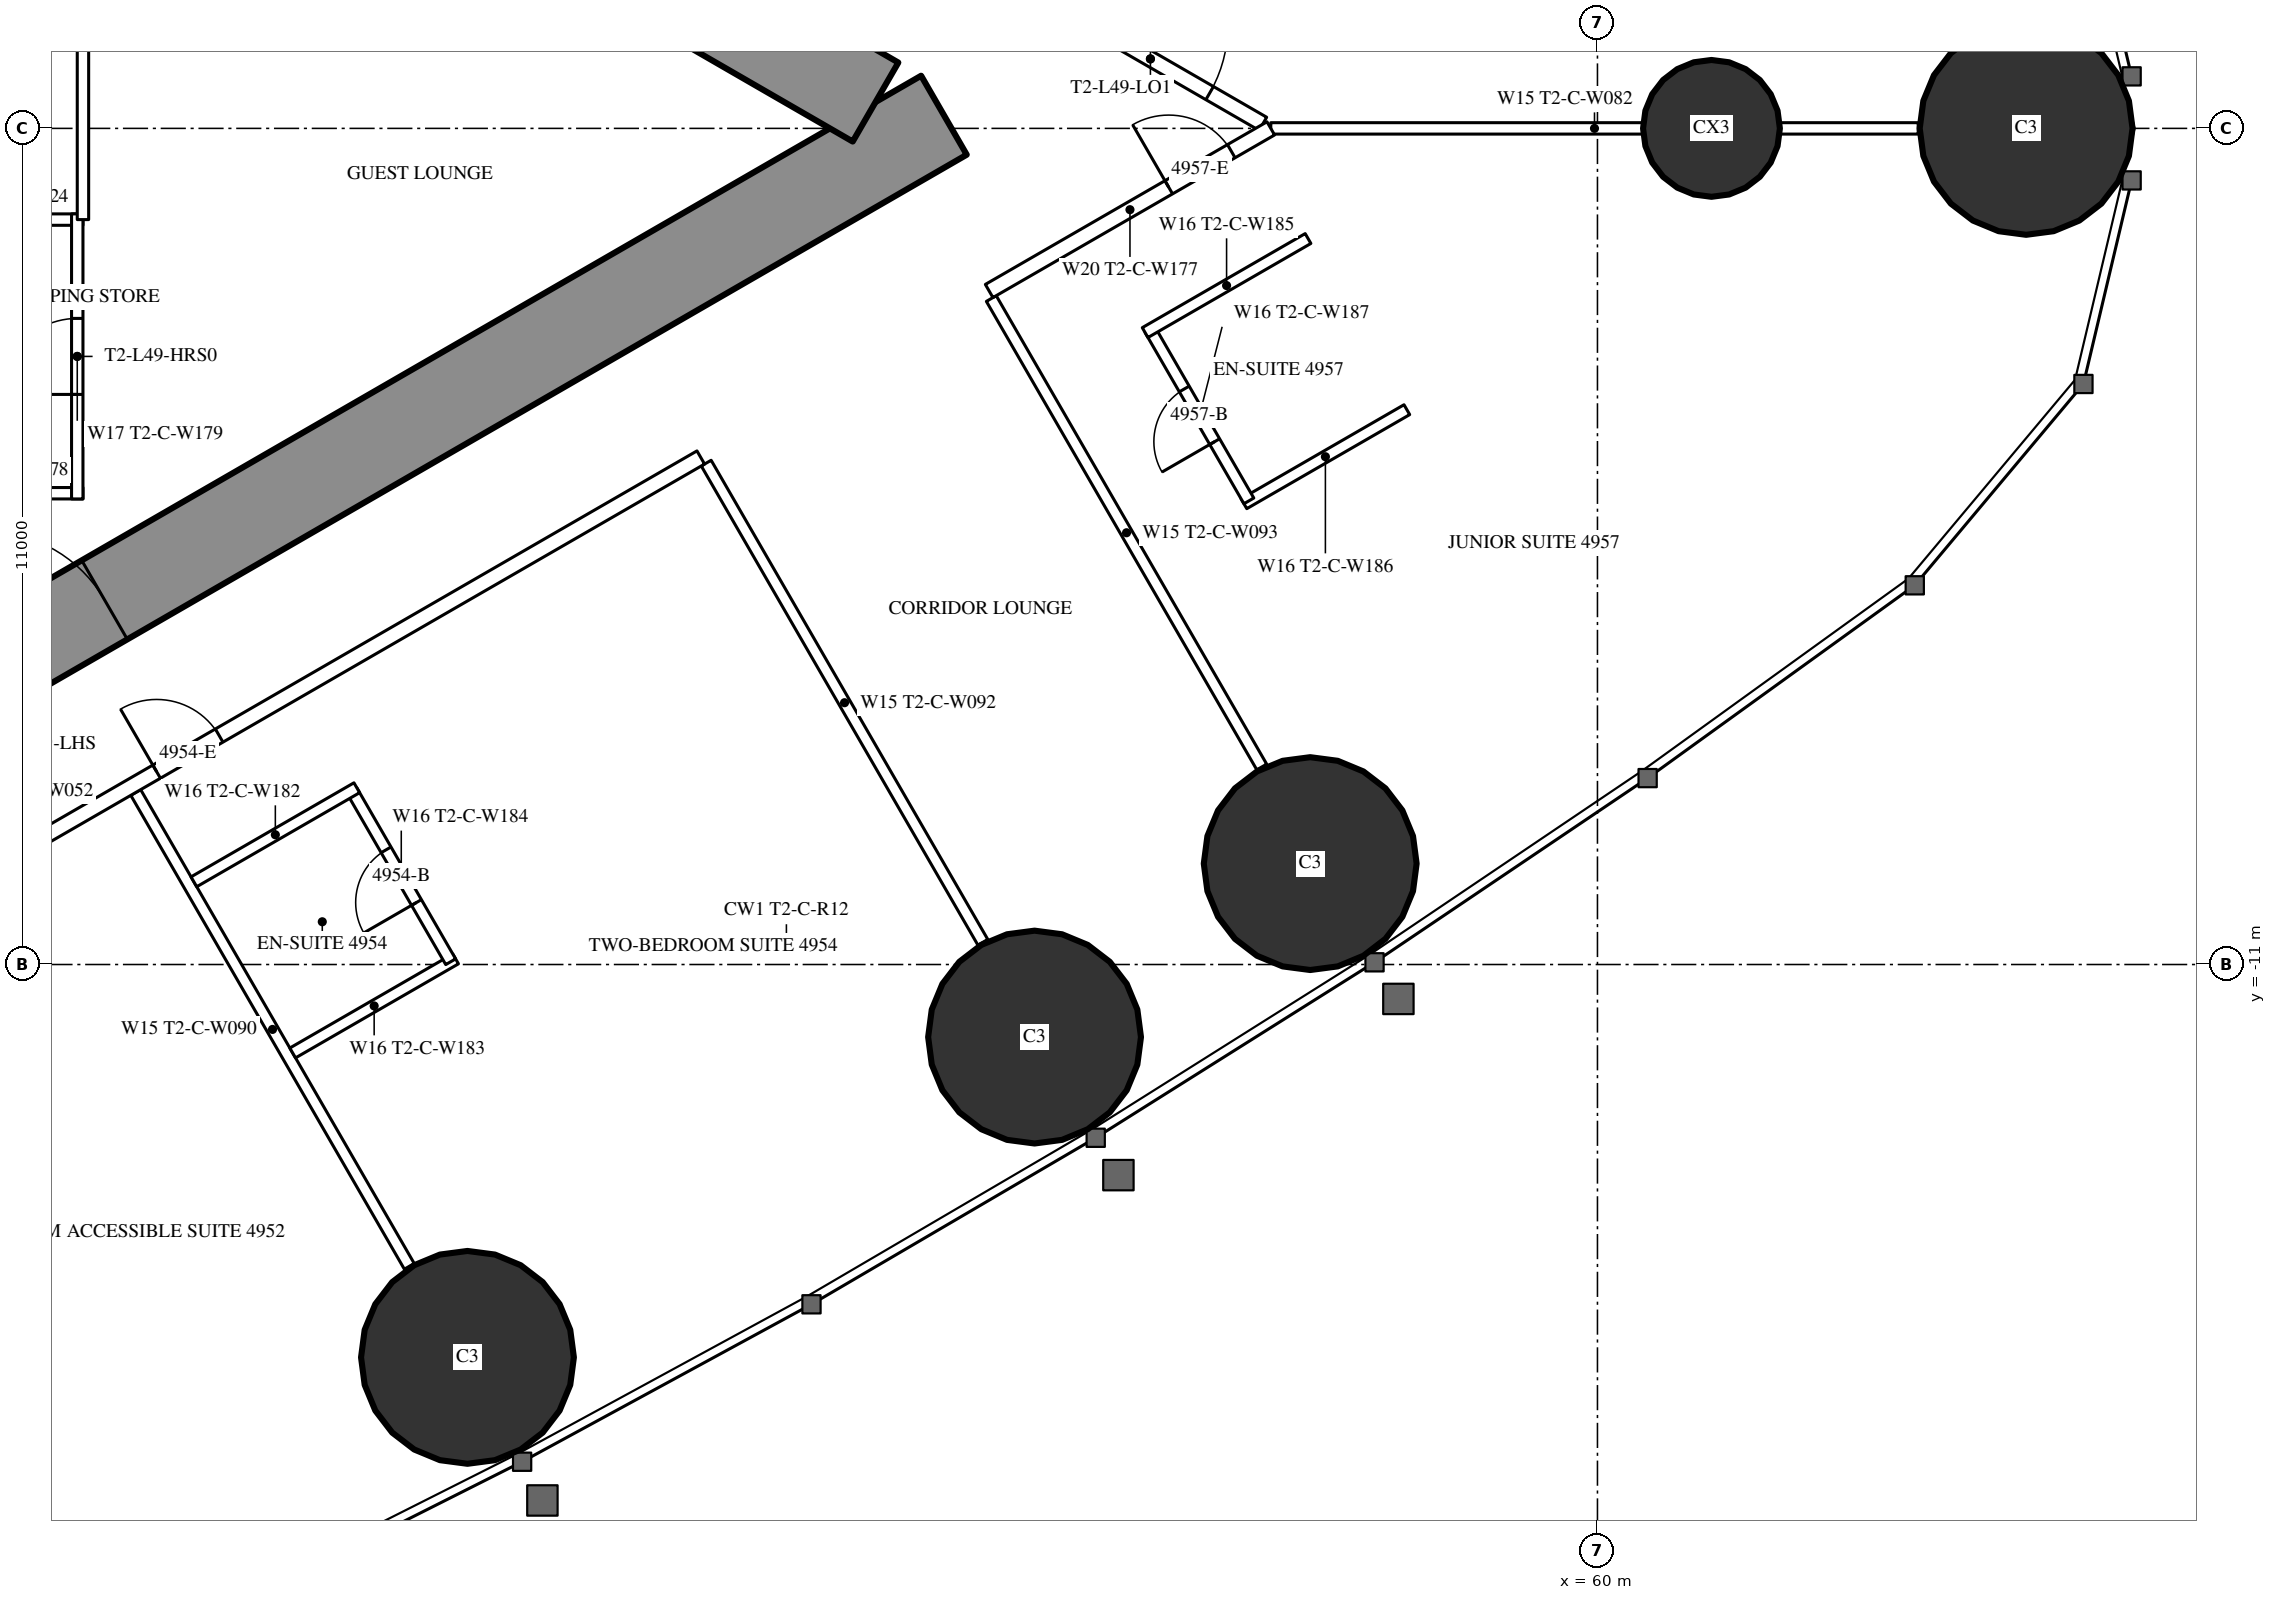
"""IFC4 building model, lengths in metres.
Left out: names, types, materials, properties, quantities, classifications, styles, units other than length and angle.
Written with IfcOpenShell. Run it as: python <this file> out.ifc"""

import sys

from ifc_helpers import new_model, si_unit, direction, frame, frame_2d, origin, origin_2d, place, context, subcontext, project, spatial, rectangle, circle, extrude, element, fill, save


model = new_model("IFC4")
c1 = context("Model", 3, precision=1e-05, world=origin(), true_north=direction((0.0, 1.0)))
c2 = subcontext(c1, "Body", "Model", "MODEL_VIEW")
j1 = project(units=[si_unit("LENGTHUNIT", "METRE"), si_unit("PLANEANGLEUNIT", "RADIAN")], contexts=[c1])
p1 = place(None, origin())
s1 = spatial("IfcSite", under=j1, at=p1, CompositionType="ELEMENT")
p2 = place(p1, origin())
s2 = spatial("IfcBuilding", under=s1, at=p2, CompositionType="ELEMENT")
p3 = place(p2, frame((0.0, 0.0, 184.3)))
s3 = spatial("IfcBuildingStorey", under=s2, at=p3, CompositionType="ELEMENT", Elevation=184.3)
for number, where, z_axis, x_axis in (
    (1, (65.64, 0.0, 0.0), (0.0, 0.0, 1.0), (1.0, 0.0, 0.0)),
    (2, (45.134, -16.168, 0.0), (0.0, 0.0, 1.0), (1.0, 0.0, 0.0)),
    (3, (52.594, -11.955, 0.0), (0.0, 0.0, 1.0), (1.0, 0.0, 0.0)),
    (4, (56.221, -9.672, 0.0), (0.0, 0.0, 1.0), (1.0, 0.0, 0.0)),
):
    element("IfcColumn", number, at=place(p3, frame(where, z_axis=z_axis, x_axis=x_axis)), inside=s3, PredefinedType="COLUMN", context=c2, shape_type="SweptSolid", body=[
        extrude(circle(Radius=1.4, at=origin_2d()), origin(), (0.0, 0.0, 1.0), 3.5),
    ])
p4 = place(p3, frame((61.5, 0.0, 0.0), z_axis=(0.0, 0.0, 1.0), x_axis=(1.0, 0.0, 0.0)))
e5 = element("IfcColumn", 5, at=p4, inside=s3, PredefinedType="COLUMN", context=c2, shape_type="SweptSolid", body=[
    extrude(circle(Radius=0.9, at=origin_2d()), origin(), (0.0, 0.0, 1.0), 3.5),
])
p5 = place(p3, frame((27.2, -13.8, 0.0), z_axis=(0.0, 0.0, 1.0), x_axis=(0.866027159892, 0.499996958321, 0.0)))
e6 = element("IfcWall", 6, at=p5, inside=s3, PredefinedType="SHEAR", context=c2, shape_type="SweptSolid", body=[
    extrude(rectangle(XDim=27.947, YDim=1.2, at=frame_2d((13.973, 0.0))), origin(), (0.0, 0.0, 1.0), 3.5),
])
p6 = place(p5, frame((4.6, 0.0, 0.0)))
e7 = element("IfcOpeningElement", 7, at=p6, cuts=e6, PredefinedType="OPENING", context=c2, shape_type="SweptSolid", body=[
    extrude(rectangle(XDim=1.0, YDim=2.2, at=frame_2d((0.5, 1.1))), frame((0.0, 0.61, 0.0), z_axis=(0.0, -1.0, 0.0), x_axis=(1.0, 0.0, 0.0)), (0.0, 0.0, 1.0), 1.22),
])
p7 = place(p5, frame((13.395, 0.0, 0.0)))
e8 = element("IfcOpeningElement", 8, at=p7, cuts=e6, PredefinedType="OPENING", context=c2, shape_type="SweptSolid", body=[
    extrude(rectangle(XDim=1.8, YDim=2.2, at=frame_2d((0.9, 1.1))), frame((0.0, 0.61, 0.0), z_axis=(0.0, -1.0, 0.0), x_axis=(1.0, 0.0, 0.0)), (0.0, 0.0, 1.0), 1.22),
])
p8 = place(p3, frame((27.2, 13.8, 0.0), z_axis=(0.0, 0.0, 1.0), x_axis=(0.866024515034, -0.500001539357, 0.0)))
e9 = element("IfcWall", 9, at=p8, inside=s3, PredefinedType="SHEAR", context=c2, shape_type="SweptSolid", body=[
    extrude(rectangle(XDim=26.907, YDim=1.2, at=frame_2d((13.454, 0.0))), origin(), (0.0, 0.0, 1.0), 3.5),
])
p9 = place(p8, frame((4.6, 0.0, 0.0)))
e10 = element("IfcOpeningElement", 10, at=p9, cuts=e9, PredefinedType="OPENING", context=c2, shape_type="SweptSolid", body=[
    extrude(rectangle(XDim=1.0, YDim=2.2, at=frame_2d((0.5, 1.1))), frame((0.0, 0.61, 0.0), z_axis=(0.0, -1.0, 0.0), x_axis=(1.0, 0.0, 0.0)), (0.0, 0.0, 1.0), 1.22),
])
p10 = place(p8, frame((13.395, 0.0, 0.0)))
e11 = element("IfcOpeningElement", 11, at=p10, cuts=e9, PredefinedType="OPENING", context=c2, shape_type="SweptSolid", body=[
    extrude(rectangle(XDim=1.8, YDim=2.2, at=frame_2d((0.9, 1.1))), frame((0.0, 0.61, 0.0), z_axis=(0.0, -1.0, 0.0), x_axis=(1.0, 0.0, 0.0)), (0.0, 0.0, 1.0), 1.22),
])
p11 = place(p3, frame((40.769, -8.737, 0.0), z_axis=(0.0, 0.0, 1.0), x_axis=(0.500013115284, -0.866017831539, 0.0)))
e12 = element("IfcWall", 12, at=p11, inside=s3, PredefinedType="PARTITIONING", context=c2, shape_type="SweptSolid", body=[
    extrude(rectangle(XDim=7.198, YDim=0.15, at=frame_2d((3.599, 0.0))), origin(), (0.0, 0.0, 1.0), 2.3),
])
p12 = place(p3, frame((48.275, -4.404, 0.0), z_axis=(0.0, 0.0, 1.0), x_axis=(0.500006004368, -0.866021937133, 0.0)))
e13 = element("IfcWall", 13, at=p12, inside=s3, PredefinedType="PARTITIONING", context=c2, shape_type="SweptSolid", body=[
    extrude(rectangle(XDim=7.279, YDim=0.15, at=frame_2d((3.64, 0.0))), origin(), (0.0, 0.0, 1.0), 2.3),
])
p13 = place(p3, frame((52.025, -2.238, 0.0), z_axis=(0.0, 0.0, 1.0), x_axis=(0.499983785035, -0.866034765296, 0.0)))
e14 = element("IfcWall", 14, at=p13, inside=s3, PredefinedType="PARTITIONING", context=c2, shape_type="SweptSolid", body=[
    extrude(rectangle(XDim=7.116, YDim=0.15, at=frame_2d((3.558, 0.0))), origin(), (0.0, 0.0, 1.0), 2.3),
])
p14 = place(p3, frame((55.702, 0.0, 0.0), z_axis=(0.0, 0.0, 1.0), x_axis=(1.0, 0.0, 0.0)))
e15 = element("IfcWall", 15, at=p14, inside=s3, PredefinedType="PARTITIONING", context=c2, shape_type="SweptSolid", body=[
    extrude(rectangle(XDim=8.518, YDim=0.15, at=frame_2d((4.259, 0.0))), origin(), (0.0, 0.0, 1.0), 2.3),
])
p15 = place(p3, frame((52.639, 1.769, 0.0), z_axis=(0.0, 0.0, 1.0), x_axis=(0.866027340901, -0.4999966448, 0.0)))
e16 = element("IfcWall", 16, at=p15, inside=s3, PredefinedType="PARTITIONING", context=c2, shape_type="SweptSolid", body=[
    extrude(rectangle(XDim=3.417, YDim=0.2, at=frame_2d((1.708, 0.0))), origin(), (0.0, 0.0, 1.0), 3.25),
])
p16 = place(p15, frame((0.809, 0.0, 0.0)))
e17 = element("IfcOpeningElement", 17, at=p16, cuts=e16, PredefinedType="OPENING", context=c2, shape_type="SweptSolid", body=[
    extrude(rectangle(XDim=1.8, YDim=2.2, at=frame_2d((0.9, 1.1))), frame((0.0, 0.11, 0.0), z_axis=(0.0, -1.0, 0.0), x_axis=(1.0, 0.0, 0.0)), (0.0, 0.0, 1.0), 0.22),
])
p17 = place(p3, frame((27.959, -16.017, 0.0), z_axis=(0.0, 0.0, 1.0), x_axis=(0.866024180982, 0.50000211795, 0.0)))
e18 = element("IfcWall", 18, at=p17, inside=s3, PredefinedType="PARTITIONING", context=c2, shape_type="SweptSolid", body=[
    extrude(rectangle(XDim=23.375, YDim=0.2, at=frame_2d((11.688, 0.0))), origin(), (0.0, 0.0, 1.0), 3.25),
])
p18 = place(p17, frame((2.415, 0.0, 0.0)))
e19 = element("IfcOpeningElement", 19, at=p18, cuts=e18, PredefinedType="OPENING", context=c2, shape_type="SweptSolid", body=[
    extrude(rectangle(XDim=0.95, YDim=2.2, at=frame_2d((0.475, 1.1))), frame((0.0, 0.11, 0.0), z_axis=(0.0, -1.0, 0.0), x_axis=(1.0, 0.0, 0.0)), (0.0, 0.0, 1.0), 0.22),
])
p19 = place(p17, frame((9.215, 0.0, 0.0)))
e20 = element("IfcOpeningElement", 20, at=p19, cuts=e18, PredefinedType="OPENING", context=c2, shape_type="SweptSolid", body=[
    extrude(rectangle(XDim=1.0, YDim=2.2, at=frame_2d((0.5, 1.1))), frame((0.0, 0.11, 0.0), z_axis=(0.0, -1.0, 0.0), x_axis=(1.0, 0.0, 0.0)), (0.0, 0.0, 1.0), 0.22),
])
p20 = place(p17, frame((15.109, 0.0, 0.0)))
e21 = element("IfcOpeningElement", 21, at=p20, cuts=e18, PredefinedType="OPENING", context=c2, shape_type="SweptSolid", body=[
    extrude(rectangle(XDim=0.95, YDim=2.2, at=frame_2d((0.475, 1.1))), frame((0.0, 0.11, 0.0), z_axis=(0.0, -1.0, 0.0), x_axis=(1.0, 0.0, 0.0)), (0.0, 0.0, 1.0), 0.22),
])
p21 = place(p3, frame((51.997, -2.139, 0.0), z_axis=(0.0, 0.0, 1.0), x_axis=(0.866036399848, 0.499980953776, 0.0)))
e22 = element("IfcWall", 22, at=p21, inside=s3, PredefinedType="PARTITIONING", context=c2, shape_type="SweptSolid", body=[
    extrude(rectangle(XDim=4.279, YDim=0.2, at=frame_2d((2.139, 0.0))), origin(), (0.0, 0.0, 1.0), 3.25),
])
p22 = place(p21, frame((2.729, 0.0, 0.0)))
e23 = element("IfcOpeningElement", 23, at=p22, cuts=e22, PredefinedType="OPENING", context=c2, shape_type="SweptSolid", body=[
    extrude(rectangle(XDim=0.95, YDim=2.2, at=frame_2d((0.475, 1.1))), frame((0.0, 0.11, 0.0), z_axis=(0.0, -1.0, 0.0), x_axis=(1.0, 0.0, 0.0)), (0.0, 0.0, 1.0), 0.22),
])
p23 = place(p3, frame((42.834, -12.164, 0.0), z_axis=(0.0, 0.0, 1.0), x_axis=(0.866031185235, 0.4999899861, 0.0)))
e24 = element("IfcWall", 24, at=p23, inside=s3, PredefinedType="PARTITIONING", context=c2, shape_type="SweptSolid", body=[
    extrude(rectangle(XDim=2.475, YDim=0.15, at=frame_2d((1.238, 0.0))), origin(), (0.0, 0.0, 1.0), 3.25),
])
p24 = place(p3, frame((43.613, -8.712, 0.0), z_axis=(0.0, 0.0, 1.0), x_axis=(0.500006934395, -0.866021400173, 0.0)))
e25 = element("IfcWall", 25, at=p24, inside=s3, PredefinedType="PARTITIONING", context=c2, shape_type="SweptSolid", body=[
    extrude(rectangle(XDim=2.6, YDim=0.15, at=frame_2d((1.3, 0.0))), origin(), (0.0, 0.0, 1.0), 3.25),
])
p25 = place(p24, frame((0.9, 0.0, 0.0)))
e26 = element("IfcOpeningElement", 26, at=p25, cuts=e25, PredefinedType="OPENING", context=c2, shape_type="SweptSolid", body=[
    extrude(rectangle(XDim=0.8, YDim=2.2, at=frame_2d((0.4, 1.1))), frame((0.0, 0.085, 0.0), z_axis=(0.0, -1.0, 0.0), x_axis=(1.0, 0.0, 0.0)), (0.0, 0.0, 1.0), 0.17),
])
p26 = place(p3, frame((41.534, -9.912, 0.0), z_axis=(0.0, 0.0, 1.0), x_axis=(0.866031185235, 0.4999899861, 0.0)))
e27 = element("IfcWall", 27, at=p26, inside=s3, PredefinedType="PARTITIONING", context=c2, shape_type="SweptSolid", body=[
    extrude(rectangle(XDim=2.475, YDim=0.15, at=frame_2d((1.238, 0.0))), origin(), (0.0, 0.0, 1.0), 3.25),
])
p27 = place(p3, frame((55.349, -4.938, 0.0), z_axis=(0.0, 0.0, 1.0), x_axis=(0.866006523861, 0.500032699561, 0.0)))
e28 = element("IfcWall", 28, at=p27, inside=s3, PredefinedType="PARTITIONING", context=c2, shape_type="SweptSolid", body=[
    extrude(rectangle(XDim=2.475, YDim=0.15, at=frame_2d((1.237, 0.0))), origin(), (0.0, 0.0, 1.0), 3.25),
])
p28 = place(p3, frame((54.114, -2.649, 0.0), z_axis=(0.0, 0.0, 1.0), x_axis=(0.500006934395, -0.866021400173, 0.0)))
e29 = element("IfcWall", 29, at=p28, inside=s3, PredefinedType="PARTITIONING", context=c2, shape_type="SweptSolid", body=[
    extrude(rectangle(XDim=2.6, YDim=0.15, at=frame_2d((1.3, 0.0))), origin(), (0.0, 0.0, 1.0), 3.25),
])
p29 = place(p28, frame((0.9, 0.0, 0.0)))
e30 = element("IfcOpeningElement", 30, at=p29, cuts=e29, PredefinedType="OPENING", context=c2, shape_type="SweptSolid", body=[
    extrude(rectangle(XDim=0.8, YDim=2.2, at=frame_2d((0.4, 1.1))), frame((0.0, 0.085, 0.0), z_axis=(0.0, -1.0, 0.0), x_axis=(1.0, 0.0, 0.0)), (0.0, 0.0, 1.0), 0.17),
])
p30 = place(p3, frame((54.049, -2.687, 0.0), z_axis=(0.0, 0.0, 1.0), x_axis=(0.866006523861, 0.500032699561, 0.0)))
e31 = element("IfcWall", 31, at=p30, inside=s3, PredefinedType="PARTITIONING", context=c2, shape_type="SweptSolid", body=[
    extrude(rectangle(XDim=2.475, YDim=0.15, at=frame_2d((1.237, 0.0))), origin(), (0.0, 0.0, 1.0), 3.25),
])
for number, where, z_axis, x_axis in (
    (32, (37.9, -1.2, 0.0), (0.0, 0.0, 1.0), (1.0, 0.0, 0.0)),
    (33, (37.9, -4.8, 0.0), (0.0, 0.0, 1.0), (1.0, 0.0, 0.0)),
):
    element("IfcWall", number, at=place(p3, frame(where, z_axis=z_axis, x_axis=x_axis)), inside=s3, PredefinedType="PARTITIONING", context=c2, shape_type="SweptSolid", body=[
        extrude(rectangle(XDim=2.175, YDim=0.15, at=frame_2d((1.087, 0.0))), origin(), (0.0, 0.0, 1.0), 3.25),
    ])
p31 = place(p3, frame((40.0, -4.875, 0.0), z_axis=(0.0, 0.0, 1.0), x_axis=(0.0, 1.0, 0.0)))
e34 = element("IfcWall", 34, at=p31, inside=s3, PredefinedType="PARTITIONING", context=c2, shape_type="SweptSolid", body=[
    extrude(rectangle(XDim=3.75, YDim=0.15, at=frame_2d((1.875, 0.0))), origin(), (0.0, 0.0, 1.0), 3.25),
])
p32 = place(p31, frame((1.375, 0.0, 0.0)))
e35 = element("IfcOpeningElement", 35, at=p32, cuts=e34, PredefinedType="OPENING", context=c2, shape_type="SweptSolid", body=[
    extrude(rectangle(XDim=1.0, YDim=2.2, at=frame_2d((0.5, 1.1))), frame((0.0, 0.085, 0.0), z_axis=(0.0, -1.0, 0.0), x_axis=(1.0, 0.0, 0.0)), (0.0, 0.0, 1.0), 0.17),
])
p33 = place(p3, frame((40.075, -1.2, 0.0), z_axis=(0.0, 0.0, 1.0), x_axis=(0.0, 1.0, 0.0)))
e36 = element("IfcWall", 36, at=p33, inside=s3, PredefinedType="PARTITIONING", context=c2, shape_type="SweptSolid", body=[
    extrude(rectangle(XDim=6.874, YDim=0.15, at=frame_2d((3.437, 0.0))), origin(), (0.0, 0.0, 1.0), 3.25),
])
p34 = place(p33, frame((2.537, 0.0, 0.0)))
e37 = element("IfcOpeningElement", 37, at=p34, cuts=e36, PredefinedType="OPENING", context=c2, shape_type="SweptSolid", body=[
    extrude(rectangle(XDim=1.8, YDim=2.2, at=frame_2d((0.9, 1.1))), frame((0.0, 0.085, 0.0), z_axis=(0.0, -1.0, 0.0), x_axis=(1.0, 0.0, 0.0)), (0.0, 0.0, 1.0), 0.17),
])
p35 = place(p25, origin())
e38 = element("IfcDoor", 38, at=p35, inside=s3, OperationType="SINGLE_SWING_RIGHT", PredefinedType="DOOR", context=c2, shape_type="SweptSolid", body=[
    extrude(rectangle(XDim=0.8, YDim=2.2, at=frame_2d((0.4, 1.1))), frame((0.0, 0.025, 0.0), z_axis=(0.0, -1.0, 0.0), x_axis=(1.0, 0.0, 0.0)), (0.0, 0.0, 1.0), 0.05),
])
fill(e26, e38)
p36 = place(p20, origin())
e39 = element("IfcDoor", 39, at=p36, inside=s3, OperationType="SINGLE_SWING_LEFT", PredefinedType="DOOR", context=c2, shape_type="SweptSolid", body=[
    extrude(rectangle(XDim=0.95, YDim=2.2, at=frame_2d((0.475, 1.1))), frame((0.0, 0.025, 0.0), z_axis=(0.0, -1.0, 0.0), x_axis=(1.0, 0.0, 0.0)), (0.0, 0.0, 1.0), 0.05),
])
fill(e21, e39)
p37 = place(p29, origin())
e40 = element("IfcDoor", 40, at=p37, inside=s3, OperationType="SINGLE_SWING_RIGHT", PredefinedType="DOOR", context=c2, shape_type="SweptSolid", body=[
    extrude(rectangle(XDim=0.8, YDim=2.2, at=frame_2d((0.4, 1.1))), frame((0.0, 0.025, 0.0), z_axis=(0.0, -1.0, 0.0), x_axis=(1.0, 0.0, 0.0)), (0.0, 0.0, 1.0), 0.05),
])
fill(e30, e40)
p38 = place(p22, origin())
e41 = element("IfcDoor", 41, at=p38, inside=s3, OperationType="SINGLE_SWING_LEFT", PredefinedType="DOOR", context=c2, shape_type="SweptSolid", body=[
    extrude(rectangle(XDim=0.95, YDim=2.2, at=frame_2d((0.475, 1.1))), frame((0.0, 0.025, 0.0), z_axis=(0.0, -1.0, 0.0), x_axis=(1.0, 0.0, 0.0)), (0.0, 0.0, 1.0), 0.05),
])
fill(e23, e41)
p39 = place(p16, origin())
e42 = element("IfcDoor", 42, at=p39, inside=s3, OperationType="DOUBLE_DOOR_SINGLE_SWING", PredefinedType="DOOR", context=c2, shape_type="SweptSolid", body=[
    extrude(rectangle(XDim=1.8, YDim=2.2, at=frame_2d((0.9, 1.1))), frame((0.0, 0.025, 0.0), z_axis=(0.0, -1.0, 0.0), x_axis=(1.0, 0.0, 0.0)), (0.0, 0.0, 1.0), 0.05),
])
fill(e17, e42)
p40 = place(p32, origin())
e43 = element("IfcDoor", 43, at=p40, inside=s3, OperationType="SINGLE_SWING_LEFT", PredefinedType="DOOR", context=c2, shape_type="SweptSolid", body=[
    extrude(rectangle(XDim=1.0, YDim=2.2, at=frame_2d((0.5, 1.1))), frame((0.0, 0.025, 0.0), z_axis=(0.0, -1.0, 0.0), x_axis=(1.0, 0.0, 0.0)), (0.0, 0.0, 1.0), 0.05),
])
fill(e35, e43)
p41 = place(p7, origin())
e44 = element("IfcDoor", 44, at=p41, inside=s3, OperationType="DOUBLE_DOOR_SINGLE_SWING", PredefinedType="DOOR", context=c2, shape_type="SweptSolid", body=[
    extrude(rectangle(XDim=1.8, YDim=2.2, at=frame_2d((0.9, 1.1))), frame((0.0, 0.025, 0.0), z_axis=(0.0, -1.0, 0.0), x_axis=(1.0, 0.0, 0.0)), (0.0, 0.0, 1.0), 0.05),
])
fill(e8, e44)
save(model, sys.argv[1])
